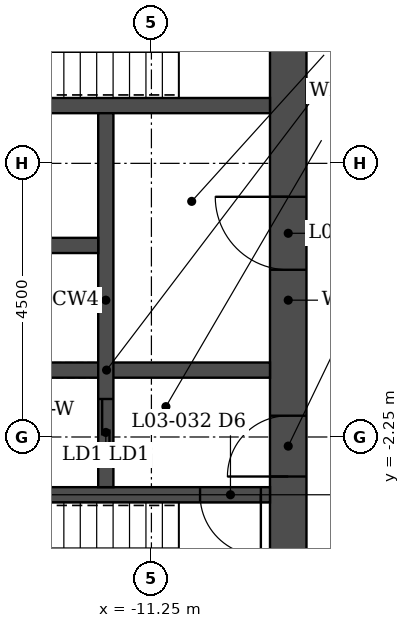
"""IFC4 building model, lengths in metres.
Left out: names, types, materials, properties, quantities, classifications, styles, units other than length and angle.
Written with IfcOpenShell. Run it as: python <this file> out.ifc"""

import sys

from ifc_helpers import new_model, si_unit, direction, frame, frame_2d, origin, place, context, subcontext, project, spatial, rectangle, extrude, element, fill, save


model = new_model("IFC4")
c1 = context("Model", 3, precision=1e-05, world=origin(), true_north=direction((0.0, 1.0)))
c2 = subcontext(c1, "Body", "Model", "MODEL_VIEW")
j1 = project(units=[si_unit("LENGTHUNIT", "METRE"), si_unit("PLANEANGLEUNIT", "RADIAN")], contexts=[c1])
p1 = place(None, origin())
s1 = spatial("IfcSite", under=j1, at=p1, CompositionType="ELEMENT")
p2 = place(p1, origin())
s2 = spatial("IfcBuilding", under=s1, at=p2, CompositionType="ELEMENT")
p3 = place(p2, frame((0.0, 0.0, 16.0)))
s3 = spatial("IfcBuildingStorey", under=s2, at=p3, CompositionType="ELEMENT", Elevation=16.0)
p4 = place(p3, frame((-9.0, -6.45, 0.0), z_axis=(0.0, 0.0, 1.0), x_axis=(0.0, 1.0, 0.0)))
e1 = element("IfcWall", 1, at=p4, inside=s3, PredefinedType="SHEAR", context=c2, shape_type="SweptSolid", body=[
    extrude(rectangle(XDim=12.9, YDim=0.6, at=frame_2d((6.45, 0.0))), origin(), (0.0, 0.0, 1.0), 5.5),
])
p5 = place(p4, frame((3.55, 0.0, 0.0)))
e2 = element("IfcOpeningElement", 2, at=p5, cuts=e1, PredefinedType="OPENING", context=c2, shape_type="SweptSolid", body=[
    extrude(rectangle(XDim=1.0, YDim=2.1, at=frame_2d((0.5, 1.05))), frame((0.0, 0.31, 0.0), z_axis=(0.0, -1.0, 0.0), x_axis=(1.0, 0.0, 0.0)), (0.0, 0.0, 1.0), 0.62),
])
p6 = place(p4, frame((6.95, 0.0, 0.0)))
e3 = element("IfcOpeningElement", 3, at=p6, cuts=e1, PredefinedType="OPENING", context=c2, shape_type="SweptSolid", body=[
    extrude(rectangle(XDim=1.2, YDim=2.1, at=frame_2d((0.6, 1.05))), frame((0.0, 0.31, 0.0), z_axis=(0.0, -1.0, 0.0), x_axis=(1.0, 0.0, 0.0)), (0.0, 0.0, 1.0), 0.62),
])
p7 = place(p4, frame((10.85, 0.0, 0.0)))
e4 = element("IfcOpeningElement", 4, at=p7, cuts=e1, PredefinedType="OPENING", context=c2, shape_type="SweptSolid", body=[
    extrude(rectangle(XDim=1.0, YDim=2.1, at=frame_2d((0.5, 1.05))), frame((0.0, 0.31, 0.0), z_axis=(0.0, -1.0, 0.0), x_axis=(1.0, 0.0, 0.0)), (0.0, 0.0, 1.0), 0.62),
])
p8 = place(p3, frame((-9.3, -3.2, 0.0), z_axis=(0.0, 0.0, 1.0), x_axis=(-1.0, 0.0, 0.0)))
e5 = element("IfcWall", 5, at=p8, inside=s3, PredefinedType="SHEAR", context=c2, shape_type="SweptSolid", body=[
    extrude(rectangle(XDim=8.4, YDim=0.25, at=frame_2d((4.2, 0.0))), origin(), (0.0, 0.0, 1.0), 5.5),
])
p9 = place(p8, frame((0.15, 0.0, 0.0)))
e6 = element("IfcOpeningElement", 6, at=p9, cuts=e5, PredefinedType="OPENING", context=c2, shape_type="SweptSolid", body=[
    extrude(rectangle(XDim=1.0, YDim=2.1, at=frame_2d((0.5, 1.05))), frame((0.0, 0.135, 0.0), z_axis=(0.0, -1.0, 0.0), x_axis=(1.0, 0.0, 0.0)), (0.0, 0.0, 1.0), 0.27),
])
p10 = place(p3, frame((-9.3, 3.2, 0.0), z_axis=(0.0, 0.0, 1.0), x_axis=(-1.0, 0.0, 0.0)))
e7 = element("IfcWall", 7, at=p10, inside=s3, PredefinedType="SHEAR", context=c2, shape_type="SweptSolid", body=[
    extrude(rectangle(XDim=8.4, YDim=0.25, at=frame_2d((4.2, 0.0))), origin(), (0.0, 0.0, 1.0), 5.5),
])
p11 = place(p3, frame((-9.3, -1.15, 0.0), z_axis=(0.0, 0.0, 1.0), x_axis=(-1.0, 0.0, 0.0)))
e8 = element("IfcWall", 8, at=p11, inside=s3, PredefinedType="SHEAR", context=c2, shape_type="SweptSolid", body=[
    extrude(rectangle(XDim=5.375, YDim=0.25, at=frame_2d((2.688, 0.0))), origin(), (0.0, 0.0, 1.0), 5.5),
])
p12 = place(p3, frame((-12.0, -3.075, 0.0), z_axis=(0.0, 0.0, 1.0), x_axis=(0.0, 1.0, 0.0)))
e9 = element("IfcWall", 9, at=p12, inside=s3, PredefinedType="SHEAR", context=c2, shape_type="SweptSolid", body=[
    extrude(rectangle(XDim=6.15, YDim=0.25, at=frame_2d((3.075, 0.0))), origin(), (0.0, 0.0, 1.0), 5.5),
])
p13 = place(p12, frame((0.35, 0.0, 0.0)))
e10 = element("IfcOpeningElement", 10, at=p13, cuts=e9, PredefinedType="OPENING", context=c2, shape_type="SweptSolid", body=[
    extrude(rectangle(XDim=1.1, YDim=2.1, at=frame_2d((0.55, 1.05))), frame((0.0, 0.135, 0.0), z_axis=(0.0, -1.0, 0.0), x_axis=(1.0, 0.0, 0.0)), (0.0, 0.0, 1.0), 0.27),
])
p14 = place(p3, frame((-12.125, 0.9, 0.0), z_axis=(0.0, 0.0, 1.0), x_axis=(-1.0, 0.0, 0.0)))
e11 = element("IfcWall", 11, at=p14, inside=s3, PredefinedType="SHEAR", context=c2, shape_type="SweptSolid", body=[
    extrude(rectangle(XDim=2.55, YDim=0.25, at=frame_2d((1.275, 0.0))), origin(), (0.0, 0.0, 1.0), 5.5),
])
p15 = place(p5, origin())
e12 = element("IfcDoor", 12, at=p15, inside=s3, OperationType="SINGLE_SWING_LEFT", PredefinedType="DOOR", context=c2, shape_type="SweptSolid", body=[
    extrude(rectangle(XDim=1.0, YDim=2.1, at=frame_2d((0.5, 1.05))), frame((0.0, 0.025, 0.0), z_axis=(0.0, -1.0, 0.0), x_axis=(1.0, 0.0, 0.0)), (0.0, 0.0, 1.0), 0.05),
])
fill(e2, e12)
p16 = place(p9, origin())
e13 = element("IfcDoor", 13, at=p16, inside=s3, OperationType="SINGLE_SWING_LEFT", PredefinedType="DOOR", context=c2, shape_type="SweptSolid", body=[
    extrude(rectangle(XDim=1.0, YDim=2.1, at=frame_2d((0.5, 1.05))), frame((0.0, 0.025, 0.0), z_axis=(0.0, -1.0, 0.0), x_axis=(1.0, 0.0, 0.0)), (0.0, 0.0, 1.0), 0.05),
])
fill(e6, e13)
p17 = place(p6, origin())
e14 = element("IfcDoor", 14, at=p17, inside=s3, OperationType="SINGLE_SWING_RIGHT", PredefinedType="DOOR", context=c2, shape_type="SweptSolid", body=[
    extrude(rectangle(XDim=1.2, YDim=2.1, at=frame_2d((0.6, 1.05))), frame((0.0, 0.025, 0.0), z_axis=(0.0, -1.0, 0.0), x_axis=(1.0, 0.0, 0.0)), (0.0, 0.0, 1.0), 0.05),
])
fill(e3, e14)
p18 = place(p13, origin())
e15 = element("IfcDoor", 15, at=p18, inside=s3, OperationType="DOUBLE_DOOR_SLIDING", PredefinedType="DOOR", context=c2, shape_type="SweptSolid", body=[
    extrude(rectangle(XDim=1.1, YDim=2.1, at=frame_2d((0.55, 1.05))), frame((0.0, 0.025, 0.0), z_axis=(0.0, -1.0, 0.0), x_axis=(1.0, 0.0, 0.0)), (0.0, 0.0, 1.0), 0.05),
])
fill(e10, e15)
save(model, sys.argv[1])
